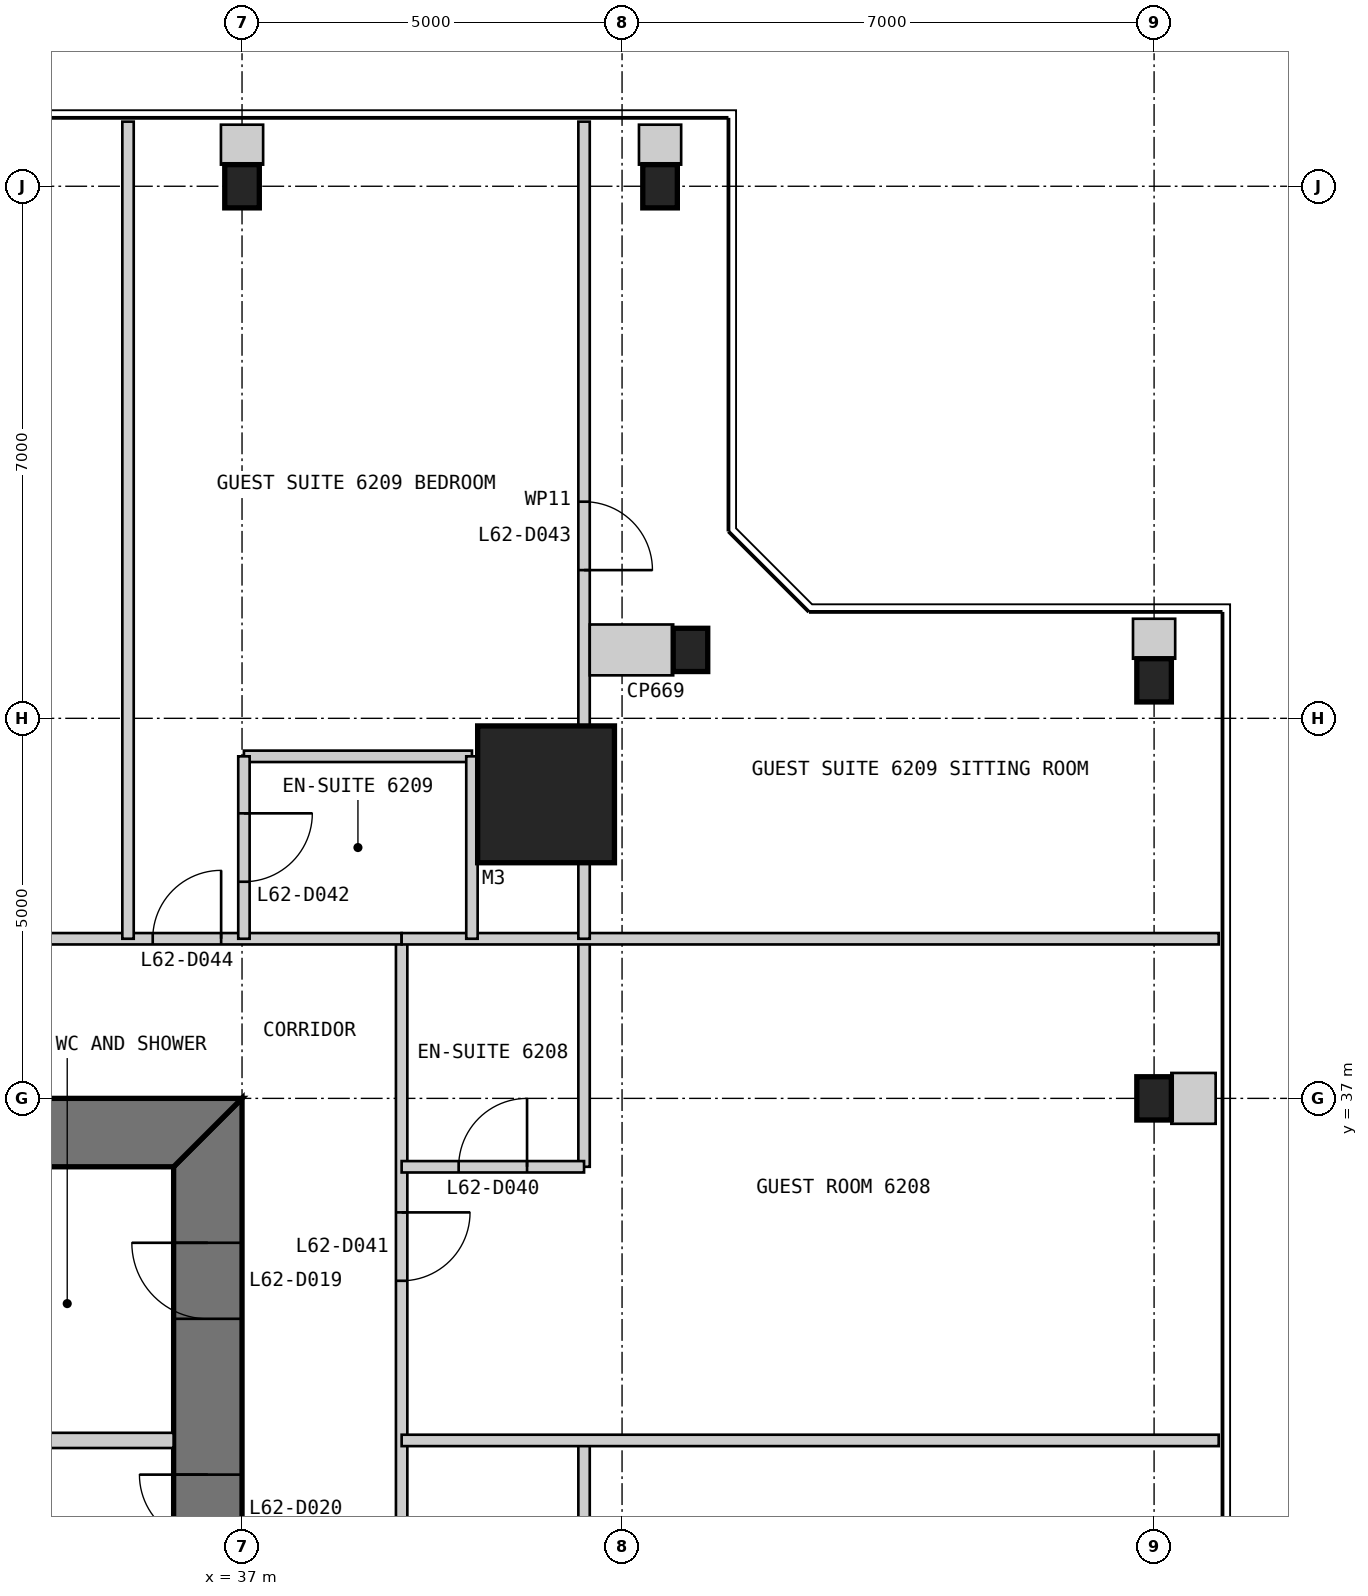
"""IFC4 building model, lengths in metres.
Left out: names, types, materials, properties, quantities, classifications, styles, units other than length and angle.
Written with IfcOpenShell. Run it as: python <this file> out.ifc"""

import sys

from ifc_helpers import new_model, si_unit, direction, frame, frame_2d, origin, origin_2d, place, context, subcontext, project, spatial, polyline, rectangle, i_section, outline, extrude, element, fill, save


model = new_model("IFC4")
c1 = context("Model", 3, precision=1e-05, world=origin(), true_north=direction((0.0, 1.0)))
c2 = subcontext(c1, "Body", "Model", "MODEL_VIEW")
j1 = project(units=[si_unit("LENGTHUNIT", "METRE"), si_unit("PLANEANGLEUNIT", "RADIAN")], contexts=[c1])
p1 = place(None, origin())
s1 = spatial("IfcSite", under=j1, at=p1, CompositionType="ELEMENT")
p2 = place(p1, origin())
s2 = spatial("IfcBuilding", under=s1, at=p2, CompositionType="ELEMENT")
p3 = place(p2, frame((0.0, 0.0, 262.8)))
s3 = spatial("IfcBuildingStorey", under=s2, at=p3, CompositionType="ELEMENT", Elevation=262.8)
p4 = place(p3, frame((41.0, 41.0, 0.0), z_axis=(0.0, 0.0, 1.0), x_axis=(1.0, 0.0, 0.0)))
e1 = element("IfcColumn", 1, at=p4, inside=s3, PredefinedType="COLUMN", context=c2, shape_type="SweptSolid", body=[
    extrude(rectangle(XDim=1.8, YDim=1.8, at=origin_2d()), origin(), (0.0, 0.0, 1.0), 3.4),
])
for number, where, z_axis, x_axis in (
    (2, (49.0, 37.0, 0.0), (0.0, 0.0, 1.0), (1.0, 0.0, 0.0)),
    (3, (49.0, 42.5, 0.0), (0.0, 0.0, 1.0), (1.0, 0.0, 0.0)),
    (4, (42.9, 42.9, 0.0), (0.0, 0.0, 1.0), (1.0, 0.0, 0.0)),
    (5, (42.5, 49.0, 0.0), (0.0, 0.0, 1.0), (1.0, 0.0, 0.0)),
    (6, (37.0, 49.0, 0.0), (0.0, 0.0, 1.0), (1.0, 0.0, 0.0)),
):
    element("IfcColumn", number, at=place(p3, frame(where, z_axis=z_axis, x_axis=x_axis)), inside=s3, PredefinedType="COLUMN", context=c2, shape_type="SweptSolid", body=[
        extrude(i_section(OverallWidth=0.455, OverallDepth=0.569, WebThickness=0.078, FlangeThickness=0.125, at=origin_2d()), origin(), (0.0, 0.0, 1.0), 3.4),
    ])
p5 = place(p3, frame((36.55, 13.9, 0.0), z_axis=(0.0, 0.0, 1.0), x_axis=(0.0, 1.0, 0.0)))
e7 = element("IfcWall", 7, at=p5, inside=s3, PredefinedType="SHEAR", context=c2, shape_type="SweptSolid", body=[
    extrude(outline(polyline([(-0.9, -0.45), (23.1, -0.45), (22.2, 0.45), (0.0, 0.45), (-0.9, -0.45)])), origin(), (0.0, 0.0, 1.0), 3.4),
])
p6 = place(p5, frame((20.2, 0.0, 0.0)))
e8 = element("IfcOpeningElement", 8, at=p6, cuts=e7, PredefinedType="OPENING", context=c2, shape_type="SweptSolid", body=[
    extrude(rectangle(XDim=1.0, YDim=2.2, at=frame_2d((0.5, 1.1))), frame((0.0, 0.46, 0.0), z_axis=(0.0, -1.0, 0.0), x_axis=(1.0, 0.0, 0.0)), (0.0, 0.0, 1.0), 0.92),
])
p7 = place(p5, frame((17.25, 0.0, 0.0)))
e9 = element("IfcOpeningElement", 9, at=p7, cuts=e7, PredefinedType="OPENING", context=c2, shape_type="SweptSolid", body=[
    extrude(rectangle(XDim=0.9, YDim=2.2, at=frame_2d((0.45, 1.1))), frame((0.0, 0.46, 0.0), z_axis=(0.0, -1.0, 0.0), x_axis=(1.0, 0.0, 0.0)), (0.0, 0.0, 1.0), 0.92),
])
p8 = place(p3, frame((37.0, 36.55, 0.0), z_axis=(0.0, 0.0, 1.0), x_axis=(-1.0, 0.0, 0.0)))
e10 = element("IfcWall", 10, at=p8, inside=s3, PredefinedType="SHEAR", context=c2, shape_type="SweptSolid", body=[
    extrude(outline(polyline([(0.0, -0.45), (24.0, -0.45), (23.1, 0.45), (0.9, 0.45), (0.0, -0.45)])), origin(), (0.0, 0.0, 1.0), 3.4),
])
p9 = place(p8, frame((4.9, 0.0, 0.0)))
e11 = element("IfcOpeningElement", 11, at=p9, cuts=e10, PredefinedType="OPENING", context=c2, shape_type="SweptSolid", body=[
    extrude(rectangle(XDim=1.0, YDim=2.2, at=frame_2d((0.5, 1.1))), frame((0.0, 0.46, 0.0), z_axis=(0.0, -1.0, 0.0), x_axis=(1.0, 0.0, 0.0)), (0.0, 0.0, 1.0), 0.92),
])
p10 = place(p8, frame((8.9, 0.0, 0.0)))
e12 = element("IfcOpeningElement", 12, at=p10, cuts=e10, PredefinedType="OPENING", context=c2, shape_type="SweptSolid", body=[
    extrude(rectangle(XDim=1.1, YDim=2.2, at=frame_2d((0.55, 1.1))), frame((0.0, 0.46, 0.0), z_axis=(0.0, -1.0, 0.0), x_axis=(1.0, 0.0, 0.0)), (0.0, 0.0, 1.0), 0.92),
])
p11 = place(p8, frame((15.05, 0.0, 0.0)))
e13 = element("IfcOpeningElement", 13, at=p11, cuts=e10, PredefinedType="OPENING", context=c2, shape_type="SweptSolid", body=[
    extrude(rectangle(XDim=0.9, YDim=2.2, at=frame_2d((0.45, 1.1))), frame((0.0, 0.46, 0.0), z_axis=(0.0, -1.0, 0.0), x_axis=(1.0, 0.0, 0.0)), (0.0, 0.0, 1.0), 0.92),
])
p12 = place(p8, frame((17.9, 0.0, 0.0)))
e14 = element("IfcOpeningElement", 14, at=p12, cuts=e10, PredefinedType="OPENING", context=c2, shape_type="SweptSolid", body=[
    extrude(rectangle(XDim=1.0, YDim=2.2, at=frame_2d((0.5, 1.1))), frame((0.0, 0.46, 0.0), z_axis=(0.0, -1.0, 0.0), x_axis=(1.0, 0.0, 0.0)), (0.0, 0.0, 1.0), 0.92),
])
p13 = place(p8, frame((21.4, 0.0, 0.0)))
e15 = element("IfcOpeningElement", 15, at=p13, cuts=e10, PredefinedType="OPENING", context=c2, shape_type="SweptSolid", body=[
    extrude(rectangle(XDim=1.0, YDim=2.2, at=frame_2d((0.5, 1.1))), frame((0.0, 0.46, 0.0), z_axis=(0.0, -1.0, 0.0), x_axis=(1.0, 0.0, 0.0)), (0.0, 0.0, 1.0), 0.92),
])
p14 = place(p3, frame((36.1, 32.5, 0.0), z_axis=(0.0, 0.0, 1.0), x_axis=(-1.0, 0.0, 0.0)))
e16 = element("IfcWall", 16, at=p14, inside=s3, PredefinedType="PARTITIONING", context=c2, shape_type="SweptSolid", body=[
    extrude(rectangle(XDim=2.8, YDim=0.2, at=frame_2d((1.4, 0.0))), origin(), (0.0, 0.0, 1.0), 3.2),
])
p15 = place(p3, frame((39.1, 10.9, 0.0), z_axis=(0.0, 0.0, 1.0), x_axis=(0.0, 1.0, 0.0)))
e17 = element("IfcWall", 17, at=p15, inside=s3, PredefinedType="PARTITIONING", context=c2, shape_type="SweptSolid", body=[
    extrude(rectangle(XDim=28.2, YDim=0.15, at=frame_2d((14.1, 0.0))), origin(), (0.0, 0.0, 1.0), 3.25),
])
p16 = place(p15, frame((2.375, 0.0, 0.0)))
e18 = element("IfcOpeningElement", 18, at=p16, cuts=e17, PredefinedType="OPENING", context=c2, shape_type="SweptSolid", body=[
    extrude(rectangle(XDim=0.9, YDim=2.1, at=frame_2d((0.45, 1.05))), frame((0.0, 0.085, 0.0), z_axis=(0.0, -1.0, 0.0), x_axis=(1.0, 0.0, 0.0)), (0.0, 0.0, 1.0), 0.17),
])
p17 = place(p15, frame((10.7, 0.0, 0.0)))
e19 = element("IfcOpeningElement", 19, at=p17, cuts=e17, PredefinedType="OPENING", context=c2, shape_type="SweptSolid", body=[
    extrude(rectangle(XDim=0.9, YDim=2.1, at=frame_2d((0.45, 1.05))), frame((0.0, 0.085, 0.0), z_axis=(0.0, -1.0, 0.0), x_axis=(1.0, 0.0, 0.0)), (0.0, 0.0, 1.0), 0.17),
])
p18 = place(p15, frame((17.1, 0.0, 0.0)))
e20 = element("IfcOpeningElement", 20, at=p18, cuts=e17, PredefinedType="OPENING", context=c2, shape_type="SweptSolid", body=[
    extrude(rectangle(XDim=0.9, YDim=2.1, at=frame_2d((0.45, 1.05))), frame((0.0, 0.085, 0.0), z_axis=(0.0, -1.0, 0.0), x_axis=(1.0, 0.0, 0.0)), (0.0, 0.0, 1.0), 0.17),
])
p19 = place(p15, frame((23.7, 0.0, 0.0)))
e21 = element("IfcOpeningElement", 21, at=p19, cuts=e17, PredefinedType="OPENING", context=c2, shape_type="SweptSolid", body=[
    extrude(rectangle(XDim=0.9, YDim=2.1, at=frame_2d((0.45, 1.05))), frame((0.0, 0.085, 0.0), z_axis=(0.0, -1.0, 0.0), x_axis=(1.0, 0.0, 0.0)), (0.0, 0.0, 1.0), 0.17),
])
p20 = place(p3, frame((41.5, 29.5, 0.0), z_axis=(0.0, 0.0, 1.0), x_axis=(0.0, 1.0, 0.0)))
e22 = element("IfcWall", 22, at=p20, inside=s3, PredefinedType="PARTITIONING", context=c2, shape_type="SweptSolid", body=[
    extrude(rectangle(XDim=3.0, YDim=0.15, at=frame_2d((1.5, 0.0))), origin(), (0.0, 0.0, 1.0), 3.25),
])
p21 = place(p3, frame((49.85, 32.5, 0.0), z_axis=(0.0, 0.0, 1.0), x_axis=(-1.0, 0.0, 0.0)))
e23 = element("IfcWall", 23, at=p21, inside=s3, PredefinedType="PARTITIONING", context=c2, shape_type="SweptSolid", body=[
    extrude(rectangle(XDim=10.75, YDim=0.15, at=frame_2d((5.375, 0.0))), origin(), (0.0, 0.0, 1.0), 3.25),
])
p22 = place(p3, frame((41.5, 36.1, 0.0), z_axis=(0.0, 0.0, 1.0), x_axis=(0.0, 1.0, 0.0)))
e24 = element("IfcWall", 24, at=p22, inside=s3, PredefinedType="PARTITIONING", context=c2, shape_type="SweptSolid", body=[
    extrude(rectangle(XDim=3.0, YDim=0.15, at=frame_2d((1.5, 0.0))), origin(), (0.0, 0.0, 1.0), 3.25),
])
p23 = place(p3, frame((41.5, 36.1, 0.0), z_axis=(0.0, 0.0, 1.0), x_axis=(-1.0, 0.0, 0.0)))
e25 = element("IfcWall", 25, at=p23, inside=s3, PredefinedType="PARTITIONING", context=c2, shape_type="SweptSolid", body=[
    extrude(rectangle(XDim=2.4, YDim=0.15, at=frame_2d((1.2, 0.0))), origin(), (0.0, 0.0, 1.0), 3.25),
])
p24 = place(p23, frame((0.75, 0.0, 0.0)))
e26 = element("IfcOpeningElement", 26, at=p24, cuts=e25, PredefinedType="OPENING", context=c2, shape_type="SweptSolid", body=[
    extrude(rectangle(XDim=0.9, YDim=2.1, at=frame_2d((0.45, 1.05))), frame((0.0, 0.085, 0.0), z_axis=(0.0, -1.0, 0.0), x_axis=(1.0, 0.0, 0.0)), (0.0, 0.0, 1.0), 0.17),
])
p25 = place(p3, frame((39.1, 39.1, 0.0), z_axis=(0.0, 0.0, 1.0), x_axis=(-1.0, 0.0, 0.0)))
e27 = element("IfcWall", 27, at=p25, inside=s3, PredefinedType="PARTITIONING", context=c2, shape_type="SweptSolid", body=[
    extrude(rectangle(XDim=28.2, YDim=0.15, at=frame_2d((14.1, 0.0))), origin(), (0.0, 0.0, 1.0), 3.25),
])
p26 = place(p25, frame((2.375, 0.0, 0.0)))
e28 = element("IfcOpeningElement", 28, at=p26, cuts=e27, PredefinedType="OPENING", context=c2, shape_type="SweptSolid", body=[
    extrude(rectangle(XDim=0.9, YDim=2.1, at=frame_2d((0.45, 1.05))), frame((0.0, 0.085, 0.0), z_axis=(0.0, -1.0, 0.0), x_axis=(1.0, 0.0, 0.0)), (0.0, 0.0, 1.0), 0.17),
])
p27 = place(p25, frame((10.7, 0.0, 0.0)))
e29 = element("IfcOpeningElement", 29, at=p27, cuts=e27, PredefinedType="OPENING", context=c2, shape_type="SweptSolid", body=[
    extrude(rectangle(XDim=0.9, YDim=2.1, at=frame_2d((0.45, 1.05))), frame((0.0, 0.085, 0.0), z_axis=(0.0, -1.0, 0.0), x_axis=(1.0, 0.0, 0.0)), (0.0, 0.0, 1.0), 0.17),
])
p28 = place(p25, frame((17.1, 0.0, 0.0)))
e30 = element("IfcOpeningElement", 30, at=p28, cuts=e27, PredefinedType="OPENING", context=c2, shape_type="SweptSolid", body=[
    extrude(rectangle(XDim=0.9, YDim=2.1, at=frame_2d((0.45, 1.05))), frame((0.0, 0.085, 0.0), z_axis=(0.0, -1.0, 0.0), x_axis=(1.0, 0.0, 0.0)), (0.0, 0.0, 1.0), 0.17),
])
p29 = place(p25, frame((23.4, 0.0, 0.0)))
e31 = element("IfcOpeningElement", 31, at=p29, cuts=e27, PredefinedType="OPENING", context=c2, shape_type="SweptSolid", body=[
    extrude(rectangle(XDim=1.0, YDim=2.1, at=frame_2d((0.5, 1.05))), frame((0.0, 0.085, 0.0), z_axis=(0.0, -1.0, 0.0), x_axis=(1.0, 0.0, 0.0)), (0.0, 0.0, 1.0), 0.17),
])
p30 = place(p3, frame((49.85, 39.1, 0.0), z_axis=(0.0, 0.0, 1.0), x_axis=(-1.0, 0.0, 0.0)))
e32 = element("IfcWall", 32, at=p30, inside=s3, PredefinedType="PARTITIONING", context=c2, shape_type="SweptSolid", body=[
    extrude(rectangle(XDim=10.75, YDim=0.15, at=frame_2d((5.375, 0.0))), origin(), (0.0, 0.0, 1.0), 3.25),
])
p31 = place(p3, frame((40.025, 41.5, 0.0), z_axis=(0.0, 0.0, 1.0), x_axis=(-1.0, 0.0, 0.0)))
e33 = element("IfcWall", 33, at=p31, inside=s3, PredefinedType="PARTITIONING", context=c2, shape_type="SweptSolid", body=[
    extrude(rectangle(XDim=3.0, YDim=0.15, at=frame_2d((1.5, 0.0))), origin(), (0.0, 0.0, 1.0), 3.25),
])
p32 = place(p3, frame((37.025, 41.5, 0.0), z_axis=(0.0, 0.0, 1.0), x_axis=(0.0, -1.0, 0.0)))
e34 = element("IfcWall", 34, at=p32, inside=s3, PredefinedType="PARTITIONING", context=c2, shape_type="SweptSolid", body=[
    extrude(rectangle(XDim=2.4, YDim=0.15, at=frame_2d((1.2, 0.0))), origin(), (0.0, 0.0, 1.0), 2.628),
])
p33 = place(p32, frame((0.75, 0.0, 0.0)))
e35 = element("IfcOpeningElement", 35, at=p33, cuts=e34, PredefinedType="OPENING", context=c2, shape_type="SweptSolid", body=[
    extrude(rectangle(XDim=0.9, YDim=2.1, at=frame_2d((0.45, 1.05))), frame((0.0, 0.085, 0.0), z_axis=(0.0, -1.0, 0.0), x_axis=(1.0, 0.0, 0.0)), (0.0, 0.0, 1.0), 0.17),
])
p34 = place(p3, frame((40.025, 41.5, 0.0), z_axis=(0.0, 0.0, 1.0), x_axis=(0.0, -1.0, 0.0)))
e36 = element("IfcWall", 36, at=p34, inside=s3, PredefinedType="PARTITIONING", context=c2, shape_type="SweptSolid", body=[
    extrude(rectangle(XDim=2.4, YDim=0.15, at=frame_2d((1.2, 0.0))), origin(), (0.0, 0.0, 1.0), 3.25),
])
p35 = place(p3, frame((41.5, 49.85, 0.0), z_axis=(0.0, 0.0, 1.0), x_axis=(0.0, -1.0, 0.0)))
e37 = element("IfcWall", 37, at=p35, inside=s3, PredefinedType="PARTITIONING", context=c2, shape_type="SweptSolid", body=[
    extrude(rectangle(XDim=10.75, YDim=0.15, at=frame_2d((5.375, 0.0))), origin(), (0.0, 0.0, 1.0), 3.25),
])
p36 = place(p35, frame((5.0, 0.0, 0.0)))
e38 = element("IfcOpeningElement", 38, at=p36, cuts=e37, PredefinedType="OPENING", context=c2, shape_type="SweptSolid", body=[
    extrude(rectangle(XDim=0.9, YDim=2.1, at=frame_2d((0.45, 1.05))), frame((0.0, 0.085, 0.0), z_axis=(0.0, -1.0, 0.0), x_axis=(1.0, 0.0, 0.0)), (0.0, 0.0, 1.0), 0.17),
])
p37 = place(p3, frame((35.5, 49.85, 0.0), z_axis=(0.0, 0.0, 1.0), x_axis=(0.0, -1.0, 0.0)))
e39 = element("IfcWall", 39, at=p37, inside=s3, PredefinedType="PARTITIONING", context=c2, shape_type="SweptSolid", body=[
    extrude(rectangle(XDim=10.75, YDim=0.15, at=frame_2d((5.375, 0.0))), origin(), (0.0, 0.0, 1.0), 3.25),
])
p38 = place(p3, frame((49.81, 37.0, 0.0), z_axis=(0.0, 0.0, 1.0), x_axis=(-1.0, 0.0, 0.0)))
e40 = element("IfcWall", 40, at=p38, inside=s3, PredefinedType="PARTITIONING", context=c2, shape_type="SweptSolid", body=[
    extrude(rectangle(XDim=0.583, YDim=0.669, at=frame_2d((0.292, 0.0))), origin(), (0.0, 0.0, 1.0), 3.25),
])
p39 = place(p3, frame((49.0, 43.31, 0.0), z_axis=(0.0, 0.0, 1.0), x_axis=(0.0, -1.0, 0.0)))
e41 = element("IfcWall", 41, at=p39, inside=s3, PredefinedType="PARTITIONING", context=c2, shape_type="SweptSolid", body=[
    extrude(rectangle(XDim=0.526, YDim=0.555, at=frame_2d((0.263, 0.0))), origin(), (0.0, 0.0, 1.0), 3.25),
])
p40 = place(p3, frame((41.575, 42.9, 0.0), z_axis=(0.0, 0.0, 1.0), x_axis=(1.0, 0.0, 0.0)))
e42 = element("IfcWall", 42, at=p40, inside=s3, PredefinedType="PARTITIONING", context=c2, shape_type="SweptSolid", body=[
    extrude(rectangle(XDim=1.098, YDim=0.669, at=frame_2d((0.549, 0.0))), origin(), (0.0, 0.0, 1.0), 3.25),
])
for number, where, z_axis, x_axis in (
    (43, (42.5, 49.81, 0.0), (0.0, 0.0, 1.0), (0.0, -1.0, 0.0)),
    (44, (37.0, 49.81, 0.0), (0.0, 0.0, 1.0), (0.0, -1.0, 0.0)),
):
    element("IfcWall", number, at=place(p3, frame(where, z_axis=z_axis, x_axis=x_axis)), inside=s3, PredefinedType="PARTITIONING", context=c2, shape_type="SweptSolid", body=[
        extrude(rectangle(XDim=0.526, YDim=0.555, at=frame_2d((0.263, 0.0))), origin(), (0.0, 0.0, 1.0), 3.25),
    ])
p41 = place(p6, origin())
e45 = element("IfcDoor", 45, at=p41, inside=s3, OperationType="SINGLE_SWING_RIGHT", PredefinedType="DOOR", context=c2, shape_type="SweptSolid", body=[
    extrude(rectangle(XDim=1.0, YDim=2.2, at=frame_2d((0.5, 1.1))), frame((0.0, 0.025, 0.0), z_axis=(0.0, -1.0, 0.0), x_axis=(1.0, 0.0, 0.0)), (0.0, 0.0, 1.0), 0.05),
    extrude(outline(polyline([(0.0, 0.0), (0.04, 0.0), (0.04, 2.16), (0.96, 2.16), (0.96, 0.0), (1.0, 0.0), (1.0, 2.2), (0.0, 2.2), (0.0, 0.0)])), frame((0.0, 0.3, 0.0), z_axis=(0.0, -1.0, 0.0), x_axis=(1.0, 0.0, 0.0)), (0.0, 0.0, 1.0), 0.6),
])
fill(e8, e45)
p42 = place(p7, origin())
e46 = element("IfcDoor", 46, at=p42, inside=s3, OperationType="SINGLE_SWING_RIGHT", PredefinedType="DOOR", context=c2, shape_type="SweptSolid", body=[
    extrude(rectangle(XDim=0.9, YDim=2.2, at=frame_2d((0.45, 1.1))), frame((0.0, 0.025, 0.0), z_axis=(0.0, -1.0, 0.0), x_axis=(1.0, 0.0, 0.0)), (0.0, 0.0, 1.0), 0.05),
    extrude(outline(polyline([(0.0, 0.0), (0.04, 0.0), (0.04, 2.16), (0.86, 2.16), (0.86, 0.0), (0.9, 0.0), (0.9, 2.2), (0.0, 2.2), (0.0, 0.0)])), frame((0.0, 0.3, 0.0), z_axis=(0.0, -1.0, 0.0), x_axis=(1.0, 0.0, 0.0)), (0.0, 0.0, 1.0), 0.6),
])
fill(e9, e46)
p43 = place(p24, frame((0.9, 0.0, 0.0), z_axis=(0.0, 0.0, 1.0), x_axis=(-1.0, 0.0, 0.0)))
e47 = element("IfcDoor", 47, at=p43, inside=s3, OperationType="SINGLE_SWING_RIGHT", PredefinedType="DOOR", context=c2, shape_type="SweptSolid", body=[
    extrude(rectangle(XDim=0.9, YDim=2.1, at=frame_2d((0.45, 1.05))), frame((0.0, 0.025, 0.0), z_axis=(0.0, -1.0, 0.0), x_axis=(1.0, 0.0, 0.0)), (0.0, 0.0, 1.0), 0.05),
])
fill(e26, e47)
p44 = place(p19, frame((0.9, 0.0, 0.0), z_axis=(0.0, 0.0, 1.0), x_axis=(-1.0, 0.0, 0.0)))
e48 = element("IfcDoor", 48, at=p44, inside=s3, OperationType="SINGLE_SWING_LEFT", PredefinedType="DOOR", context=c2, shape_type="SweptSolid", body=[
    extrude(rectangle(XDim=0.9, YDim=2.1, at=frame_2d((0.45, 1.05))), frame((0.0, 0.025, 0.0), z_axis=(0.0, -1.0, 0.0), x_axis=(1.0, 0.0, 0.0)), (0.0, 0.0, 1.0), 0.05),
])
fill(e21, e48)
p45 = place(p33, origin())
e49 = element("IfcDoor", 49, at=p45, inside=s3, OperationType="SINGLE_SWING_LEFT", PredefinedType="DOOR", context=c2, shape_type="SweptSolid", body=[
    extrude(rectangle(XDim=0.9, YDim=2.1, at=frame_2d((0.45, 1.05))), frame((0.0, 0.025, 0.0), z_axis=(0.0, -1.0, 0.0), x_axis=(1.0, 0.0, 0.0)), (0.0, 0.0, 1.0), 0.05),
])
fill(e35, e49)
p46 = place(p36, origin())
e50 = element("IfcDoor", 50, at=p46, inside=s3, OperationType="SINGLE_SWING_RIGHT", PredefinedType="DOOR", context=c2, shape_type="SweptSolid", body=[
    extrude(rectangle(XDim=0.9, YDim=2.1, at=frame_2d((0.45, 1.05))), frame((0.0, 0.025, 0.0), z_axis=(0.0, -1.0, 0.0), x_axis=(1.0, 0.0, 0.0)), (0.0, 0.0, 1.0), 0.05),
])
fill(e38, e50)
p47 = place(p26, frame((0.9, 0.0, 0.0), z_axis=(0.0, 0.0, 1.0), x_axis=(-1.0, 0.0, 0.0)))
e51 = element("IfcDoor", 51, at=p47, inside=s3, OperationType="SINGLE_SWING_RIGHT", PredefinedType="DOOR", context=c2, shape_type="SweptSolid", body=[
    extrude(rectangle(XDim=0.9, YDim=2.1, at=frame_2d((0.45, 1.05))), frame((0.0, 0.025, 0.0), z_axis=(0.0, -1.0, 0.0), x_axis=(1.0, 0.0, 0.0)), (0.0, 0.0, 1.0), 0.05),
])
fill(e28, e51)
save(model, sys.argv[1])
